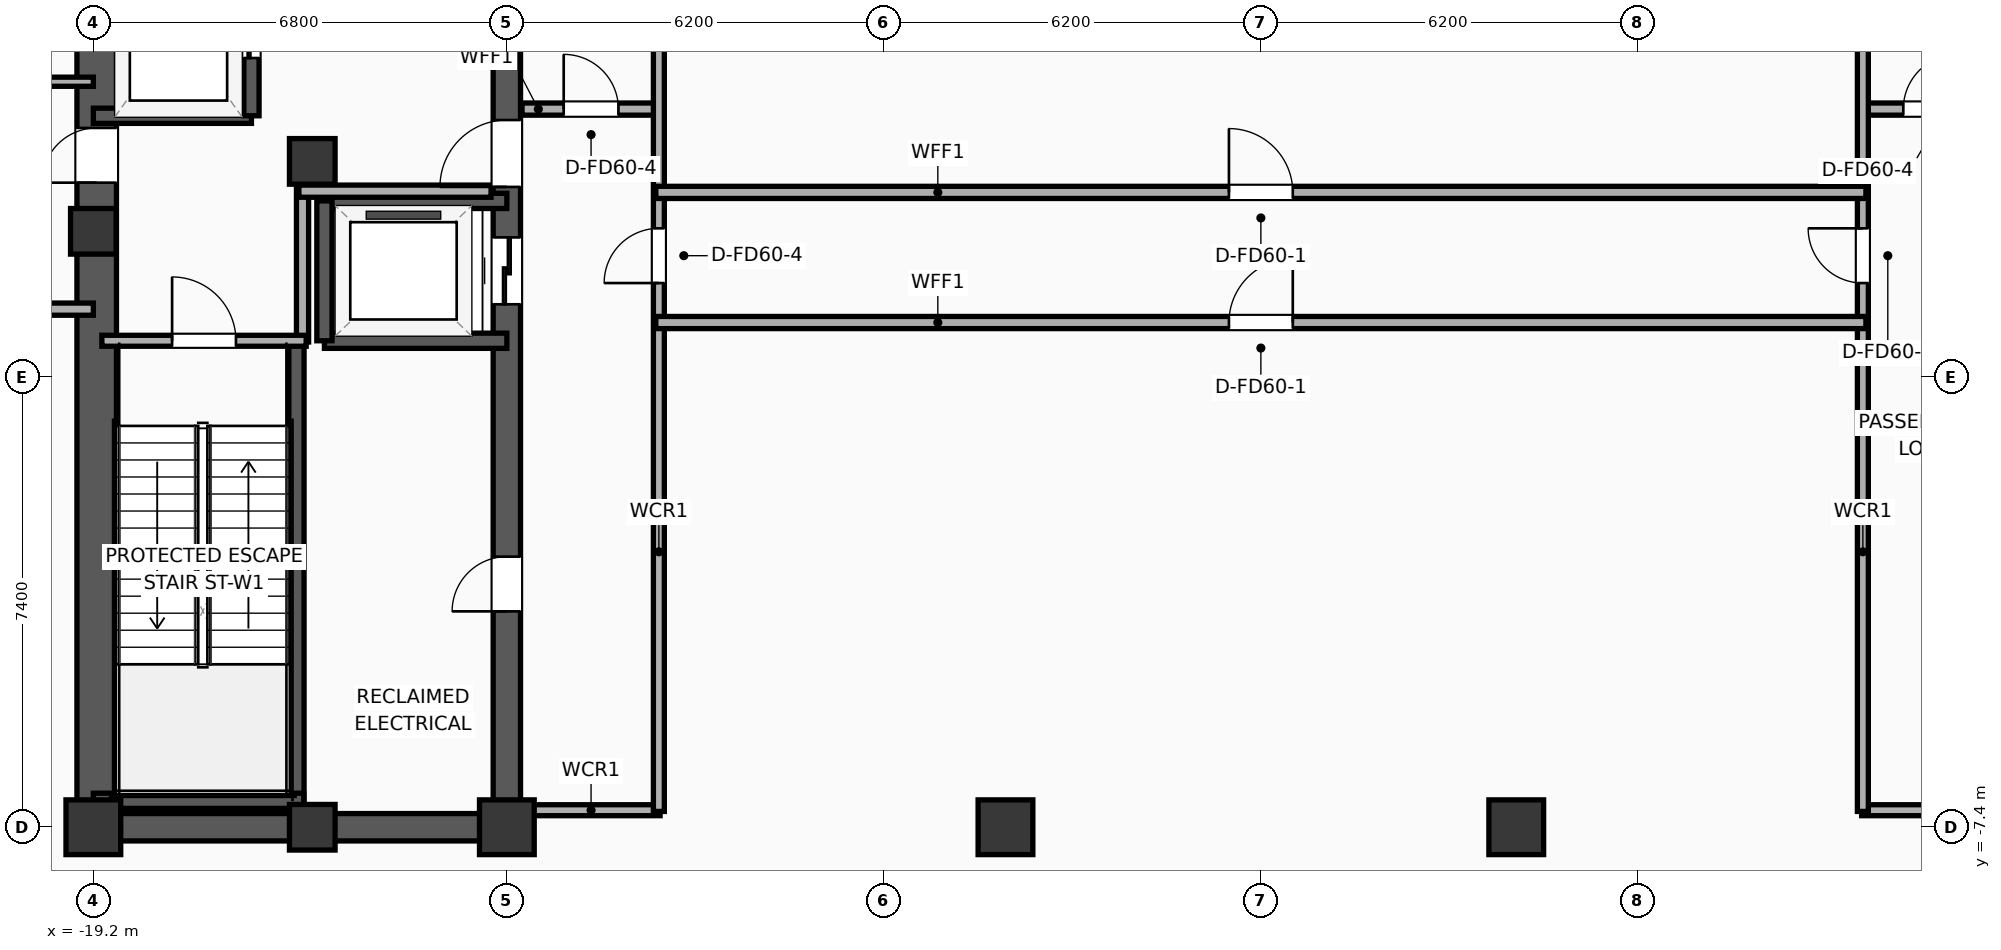
"""IFC4 building model, lengths in metres.
Left out: names, types, materials, properties, quantities, classifications, styles, units other than length and angle.
Written with IfcOpenShell. Run it as: python <this file> out.ifc"""

import sys

from ifc_helpers import new_model, si_unit, direction, frame, frame_2d, origin, origin_2d, place, context, subcontext, project, spatial, rectangle, extrude, element, fill, save


model = new_model("IFC4")
c1 = context("Model", 3, precision=1e-05, world=origin(), true_north=direction((0.0, 1.0)))
c2 = subcontext(c1, "Body", "Model", "MODEL_VIEW")
j1 = project(units=[si_unit("LENGTHUNIT", "METRE"), si_unit("PLANEANGLEUNIT", "RADIAN")], contexts=[c1])
p1 = place(None, origin())
s1 = spatial("IfcSite", under=j1, at=p1, CompositionType="ELEMENT")
p2 = place(p1, origin())
s2 = spatial("IfcBuilding", under=s1, at=p2, CompositionType="ELEMENT")
p3 = place(p2, frame((0.0, 0.0, 254.8)))
s3 = spatial("IfcBuildingStorey", under=s2, at=p3, CompositionType="ELEMENT", Elevation=254.8)
p4 = place(p3, frame((-19.2, -7.4, 0.0), z_axis=(0.0, 0.0, 1.0), x_axis=(1.0, 0.0, 0.0)))
e1 = element("IfcColumn", 1, at=p4, inside=s3, PredefinedType="COLUMN", context=c2, shape_type="SweptSolid", body=[
    extrude(rectangle(XDim=0.9, YDim=0.9, at=origin_2d()), origin(), (0.0, 0.0, 1.0), 5.2),
])
for number, where, z_axis, x_axis in (
    (2, (-19.2, 2.4, 0.0), (0.0, 0.0, 1.0), (1.0, 0.0, 0.0)),
    (3, (-15.6, -7.4, 0.0), (0.0, 0.0, 1.0), (1.0, 0.0, 0.0)),
):
    element("IfcColumn", number, at=place(p3, frame(where, z_axis=z_axis, x_axis=x_axis)), inside=s3, PredefinedType="COLUMN", context=c2, shape_type="SweptSolid", body=[
        extrude(rectangle(XDim=0.75, YDim=0.75, at=origin_2d()), origin(), (0.0, 0.0, 1.0), 5.2),
    ])
p5 = place(p3, frame((-12.4, -7.4, 0.0), z_axis=(0.0, 0.0, 1.0), x_axis=(1.0, 0.0, 0.0)))
e4 = element("IfcColumn", 4, at=p5, inside=s3, PredefinedType="COLUMN", context=c2, shape_type="SweptSolid", body=[
    extrude(rectangle(XDim=0.9, YDim=0.9, at=origin_2d()), origin(), (0.0, 0.0, 1.0), 5.2),
])
p6 = place(p3, frame((-15.6, 3.55, 0.0), z_axis=(0.0, 0.0, 1.0), x_axis=(1.0, 0.0, 0.0)))
e5 = element("IfcColumn", 5, at=p6, inside=s3, PredefinedType="COLUMN", context=c2, shape_type="SweptSolid", body=[
    extrude(rectangle(XDim=0.75, YDim=0.75, at=origin_2d()), origin(), (0.0, 0.0, 1.0), 5.2),
])
p7 = place(p3, frame((-19.425, -7.4, 0.0), z_axis=(0.0, 0.0, 1.0), x_axis=(1.0, 0.0, 0.0)))
e6 = element("IfcWall", 6, at=p7, inside=s3, PredefinedType="SHEAR", context=c2, shape_type="SweptSolid", body=[
    extrude(rectangle(XDim=7.25, YDim=0.45, at=frame_2d((3.625, 0.0))), origin(), (0.0, 0.0, 1.0), 4.8),
])
p8 = place(p3, frame((-19.145, -7.4, 0.0), z_axis=(0.0, 0.0, 1.0), x_axis=(0.0, 1.0, 0.0)))
e7 = element("IfcWall", 7, at=p8, inside=s3, PredefinedType="SHEAR", context=c2, shape_type="SweptSolid", body=[
    extrude(rectangle(XDim=14.8, YDim=0.65, at=frame_2d((7.4, 0.0))), origin(), (0.0, 0.0, 1.0), 4.8),
])
p9 = place(p8, frame((10.6, 0.0, 0.0)))
e8 = element("IfcOpeningElement", 8, at=p9, cuts=e7, PredefinedType="OPENING", context=c2, shape_type="SweptSolid", body=[
    extrude(rectangle(XDim=0.9, YDim=2.05, at=frame_2d((0.45, 1.025))), frame((0.0, 0.335, 0.0), z_axis=(0.0, -1.0, 0.0), x_axis=(1.0, 0.0, 0.0)), (0.0, 0.0, 1.0), 0.67),
])
p10 = place(p3, frame((-12.4, -7.4, 0.0), z_axis=(0.0, 0.0, 1.0), x_axis=(0.0, 1.0, 0.0)))
e9 = element("IfcWall", 9, at=p10, inside=s3, PredefinedType="SHEAR", context=c2, shape_type="SweptSolid", body=[
    extrude(rectangle(XDim=14.8, YDim=0.45, at=frame_2d((7.4, 0.0))), origin(), (0.0, 0.0, 1.0), 4.8),
])
p11 = place(p10, frame((8.6, 0.0, 0.0)))
e10 = element("IfcOpeningElement", 10, at=p11, cuts=e9, PredefinedType="OPENING", context=c2, shape_type="SweptSolid", body=[
    extrude(rectangle(XDim=1.1, YDim=2.05, at=frame_2d((0.55, 1.025))), frame((0.0, 0.235, 0.0), z_axis=(0.0, -1.0, 0.0), x_axis=(1.0, 0.0, 0.0)), (0.0, 0.0, 1.0), 0.47),
])
p12 = place(p10, frame((10.53, 0.0, 0.0)))
e11 = element("IfcOpeningElement", 11, at=p12, cuts=e9, PredefinedType="OPENING", context=c2, shape_type="SweptSolid", body=[
    extrude(rectangle(XDim=1.1, YDim=2.05, at=frame_2d((0.55, 1.025))), frame((0.0, 0.235, 0.0), z_axis=(0.0, -1.0, 0.0), x_axis=(1.0, 0.0, 0.0)), (0.0, 0.0, 1.0), 0.47),
])
p13 = place(p10, frame((3.55, 0.0, 0.0)))
e12 = element("IfcOpeningElement", 12, at=p13, cuts=e9, PredefinedType="OPENING", context=c2, shape_type="SweptSolid", body=[
    extrude(rectangle(XDim=0.9, YDim=2.05, at=frame_2d((0.45, 1.025))), frame((0.0, 0.235, 0.0), z_axis=(0.0, -1.0, 0.0), x_axis=(1.0, 0.0, 0.0)), (0.0, 0.0, 1.0), 0.47),
])
p14 = place(p3, frame((-15.86, -7.085, 0.0), z_axis=(0.0, 0.0, 1.0), x_axis=(0.0, 1.0, 0.0)))
e13 = element("IfcWall", 13, at=p14, inside=s3, PredefinedType="SOLIDWALL", context=c2, shape_type="SweptSolid", body=[
    extrude(rectangle(XDim=7.685, YDim=0.25, at=frame_2d((3.843, 0.0))), origin(), (0.0, 0.0, 1.0), 4.8),
])
p15 = place(p3, frame((-19.2, -6.965, 0.0), z_axis=(0.0, 0.0, 1.0), x_axis=(1.0, 0.0, 0.0)))
e14 = element("IfcWall", 14, at=p15, inside=s3, PredefinedType="SOLIDWALL", context=c2, shape_type="SweptSolid", body=[
    extrude(rectangle(XDim=3.46, YDim=0.25, at=frame_2d((1.73, 0.0))), origin(), (0.0, 0.0, 1.0), 4.8),
])
for number, where, z_axis, x_axis in (
    (15, (-4.2, -7.4, 0.0), (0.0, 0.0, 1.0), (1.0, 0.0, 0.0)),
    (16, (4.2, -7.4, 0.0), (0.0, 0.0, 1.0), (1.0, 0.0, 0.0)),
):
    element("IfcColumn", number, at=place(p3, frame(where, z_axis=z_axis, x_axis=x_axis)), inside=s3, PredefinedType="COLUMN", context=c2, shape_type="SweptSolid", body=[
        extrude(rectangle(XDim=0.9, YDim=0.9, at=origin_2d()), origin(), (0.0, 0.0, 1.0), 5.2),
    ])
p16 = place(p3, frame((-19.2, 4.3, 0.0), z_axis=(0.0, 0.0, 1.0), x_axis=(1.0, 0.0, 0.0)))
e17 = element("IfcWall", 17, at=p16, inside=s3, PredefinedType="SOLIDWALL", context=c2, shape_type="SweptSolid", body=[
    extrude(rectangle(XDim=2.6, YDim=0.25, at=frame_2d((1.3, 0.0))), origin(), (0.0, 0.0, 1.0), 4.8),
])
p17 = place(p3, frame((-16.6, 4.3, 0.0), z_axis=(0.0, 0.0, 1.0), x_axis=(0.0, 1.0, 0.0)))
e18 = element("IfcWall", 18, at=p17, inside=s3, PredefinedType="SOLIDWALL", context=c2, shape_type="SweptSolid", body=[
    extrude(rectangle(XDim=3.1, YDim=0.25, at=frame_2d((1.55, 0.0))), origin(), (0.0, 0.0, 1.0), 4.8),
])
p18 = place(p17, frame((0.95, 0.0, 0.0)))
e19 = element("IfcOpeningElement", 19, at=p18, cuts=e18, PredefinedType="OPENING", context=c2, shape_type="SweptSolid", body=[
    extrude(rectangle(XDim=1.2, YDim=2.05, at=frame_2d((0.6, 1.025))), frame((0.0, 0.135, 0.0), z_axis=(0.0, -1.0, 0.0), x_axis=(1.0, 0.0, 0.0)), (0.0, 0.0, 1.0), 0.27),
])
for number, where, z_axis, x_axis in (
    (20, (-15.4, 0.6, 0.0), (0.0, 0.0, 1.0), (1.0, 0.0, 0.0)),
    (21, (-12.4, 2.9, 0.0), (0.0, 0.0, 1.0), (-1.0, 0.0, 0.0)),
):
    element("IfcWall", number, at=place(p3, frame(where, z_axis=z_axis, x_axis=x_axis)), inside=s3, PredefinedType="SOLIDWALL", context=c2, shape_type="SweptSolid", body=[
        extrude(rectangle(XDim=3.0, YDim=0.25, at=frame_2d((1.5, 0.0))), origin(), (0.0, 0.0, 1.0), 4.8),
    ])
p19 = place(p3, frame((-15.4, 2.9, 0.0), z_axis=(0.0, 0.0, 1.0), x_axis=(0.0, -1.0, 0.0)))
e22 = element("IfcWall", 22, at=p19, inside=s3, PredefinedType="SOLIDWALL", context=c2, shape_type="SweptSolid", body=[
    extrude(rectangle(XDim=2.3, YDim=0.25, at=frame_2d((1.15, 0.0))), origin(), (0.0, 0.0, 1.0), 4.8),
])
p20 = place(p3, frame((-15.76, 0.58, 0.0), z_axis=(0.0, 0.0, 1.0), x_axis=(0.0, 1.0, 0.0)))
e23 = element("IfcWall", 23, at=p20, inside=s3, PredefinedType="PARTITIONING", context=c2, shape_type="SweptSolid", body=[
    extrude(rectangle(XDim=2.52, YDim=0.2, at=frame_2d((1.26, 0.0))), origin(), (0.0, 0.0, 1.0), 4.8),
])
p21 = place(p3, frame((-15.82, 3.06, 0.0), z_axis=(0.0, 0.0, 1.0), x_axis=(1.0, 0.0, 0.0)))
e24 = element("IfcWall", 24, at=p21, inside=s3, PredefinedType="PARTITIONING", context=c2, shape_type="SweptSolid", body=[
    extrude(rectangle(XDim=3.16, YDim=0.2, at=frame_2d((1.58, 0.0))), origin(), (0.0, 0.0, 1.0), 4.8),
])
p22 = place(p3, frame((-19.06, 0.6, 0.0), z_axis=(0.0, 0.0, 1.0), x_axis=(1.0, 0.0, 0.0)))
e25 = element("IfcWall", 25, at=p22, inside=s3, PredefinedType="PARTITIONING", context=c2, shape_type="SweptSolid", body=[
    extrude(rectangle(XDim=3.36, YDim=0.18, at=frame_2d((1.68, 0.0))), origin(), (0.0, 0.0, 1.0), 4.8),
])
p23 = place(p22, frame((1.155, 0.0, 0.0)))
e26 = element("IfcOpeningElement", 26, at=p23, cuts=e25, PredefinedType="OPENING", context=c2, shape_type="SweptSolid", body=[
    extrude(rectangle(XDim=1.05, YDim=2.05, at=frame_2d((0.525, 1.025))), frame((0.0, 0.1, 0.0), z_axis=(0.0, -1.0, 0.0), x_axis=(1.0, 0.0, 0.0)), (0.0, 0.0, 1.0), 0.2),
])
p24 = place(p3, frame((-12.15, 4.41, 0.0), z_axis=(0.0, 0.0, 1.0), x_axis=(1.0, 0.0, 0.0)))
e27 = element("IfcWall", 27, at=p24, inside=s3, PredefinedType="PARTITIONING", context=c2, shape_type="SweptSolid", body=[
    extrude(rectangle(XDim=2.27, YDim=0.2, at=frame_2d((1.135, 0.0))), origin(), (0.0, 0.0, 1.0), 4.8),
])
p25 = place(p24, frame((0.685, 0.0, 0.0)))
e28 = element("IfcOpeningElement", 28, at=p25, cuts=e27, PredefinedType="OPENING", context=c2, shape_type="SweptSolid", body=[
    extrude(rectangle(XDim=0.9, YDim=2.05, at=frame_2d((0.45, 1.025))), frame((0.0, 0.11, 0.0), z_axis=(0.0, -1.0, 0.0), x_axis=(1.0, 0.0, 0.0)), (0.0, 0.0, 1.0), 0.22),
])
p26 = place(p3, frame((-12.15, -7.12, 0.0), z_axis=(0.0, 0.0, 1.0), x_axis=(1.0, 0.0, 0.0)))
e29 = element("IfcWall", 29, at=p26, inside=s3, PredefinedType="PARTITIONING", context=c2, shape_type="SweptSolid", body=[
    extrude(rectangle(XDim=2.27, YDim=0.18, at=frame_2d((1.135, 0.0))), origin(), (0.0, 0.0, 1.0), 3.84),
])
p27 = place(p3, frame((9.88, 4.41, 0.0), z_axis=(0.0, 0.0, 1.0), x_axis=(1.0, 0.0, 0.0)))
e30 = element("IfcWall", 30, at=p27, inside=s3, PredefinedType="PARTITIONING", context=c2, shape_type="SweptSolid", body=[
    extrude(rectangle(XDim=2.27, YDim=0.2, at=frame_2d((1.135, 0.0))), origin(), (0.0, 0.0, 1.0), 4.8),
])
p28 = place(p27, frame((0.685, 0.0, 0.0)))
e31 = element("IfcOpeningElement", 31, at=p28, cuts=e30, PredefinedType="OPENING", context=c2, shape_type="SweptSolid", body=[
    extrude(rectangle(XDim=0.9, YDim=2.05, at=frame_2d((0.45, 1.025))), frame((0.0, 0.11, 0.0), z_axis=(0.0, -1.0, 0.0), x_axis=(1.0, 0.0, 0.0)), (0.0, 0.0, 1.0), 0.22),
])
p29 = place(p3, frame((9.88, -7.12, 0.0), z_axis=(0.0, 0.0, 1.0), x_axis=(1.0, 0.0, 0.0)))
e32 = element("IfcWall", 32, at=p29, inside=s3, PredefinedType="PARTITIONING", context=c2, shape_type="SweptSolid", body=[
    extrude(rectangle(XDim=2.27, YDim=0.18, at=frame_2d((1.135, 0.0))), origin(), (0.0, 0.0, 1.0), 3.84),
])
p30 = place(p3, frame((-9.9, -7.14, 0.0), z_axis=(0.0, 0.0, 1.0), x_axis=(0.0, 1.0, 0.0)))
e33 = element("IfcWall", 33, at=p30, inside=s3, PredefinedType="PARTITIONING", context=c2, shape_type="SweptSolid", body=[
    extrude(rectangle(XDim=14.28, YDim=0.18, at=frame_2d((7.14, 0.0))), origin(), (0.0, 0.0, 1.0), 4.8),
])
p31 = place(p30, frame((8.689, 0.0, 0.0)))
e34 = element("IfcOpeningElement", 34, at=p31, cuts=e33, PredefinedType="OPENING", context=c2, shape_type="SweptSolid", body=[
    extrude(rectangle(XDim=0.9, YDim=2.05, at=frame_2d((0.45, 1.025))), frame((0.0, 0.1, 0.0), z_axis=(0.0, -1.0, 0.0), x_axis=(1.0, 0.0, 0.0)), (0.0, 0.0, 1.0), 0.2),
])
p32 = place(p3, frame((9.9, -7.14, 0.0), z_axis=(0.0, 0.0, 1.0), x_axis=(0.0, 1.0, 0.0)))
e35 = element("IfcWall", 35, at=p32, inside=s3, PredefinedType="PARTITIONING", context=c2, shape_type="SweptSolid", body=[
    extrude(rectangle(XDim=14.28, YDim=0.18, at=frame_2d((7.14, 0.0))), origin(), (0.0, 0.0, 1.0), 4.8),
])
p33 = place(p32, frame((8.689, 0.0, 0.0)))
e36 = element("IfcOpeningElement", 36, at=p33, cuts=e35, PredefinedType="OPENING", context=c2, shape_type="SweptSolid", body=[
    extrude(rectangle(XDim=0.9, YDim=2.05, at=frame_2d((0.45, 1.025))), frame((0.0, 0.1, 0.0), z_axis=(0.0, -1.0, 0.0), x_axis=(1.0, 0.0, 0.0)), (0.0, 0.0, 1.0), 0.2),
])
p34 = place(p3, frame((-9.95, 3.04, 0.0), z_axis=(0.0, 0.0, 1.0), x_axis=(1.0, 0.0, 0.0)))
e37 = element("IfcWall", 37, at=p34, inside=s3, PredefinedType="PARTITIONING", context=c2, shape_type="SweptSolid", body=[
    extrude(rectangle(XDim=19.9, YDim=0.2, at=frame_2d((9.95, 0.0))), origin(), (0.0, 0.0, 1.0), 4.8),
])
p35 = place(p34, frame((9.425, 0.0, 0.0)))
e38 = element("IfcOpeningElement", 38, at=p35, cuts=e37, PredefinedType="OPENING", context=c2, shape_type="SweptSolid", body=[
    extrude(rectangle(XDim=1.05, YDim=2.05, at=frame_2d((0.525, 1.025))), frame((0.0, 0.11, 0.0), z_axis=(0.0, -1.0, 0.0), x_axis=(1.0, 0.0, 0.0)), (0.0, 0.0, 1.0), 0.22),
])
p36 = place(p3, frame((-9.95, 0.9, 0.0), z_axis=(0.0, 0.0, 1.0), x_axis=(1.0, 0.0, 0.0)))
e39 = element("IfcWall", 39, at=p36, inside=s3, PredefinedType="PARTITIONING", context=c2, shape_type="SweptSolid", body=[
    extrude(rectangle(XDim=19.9, YDim=0.2, at=frame_2d((9.95, 0.0))), origin(), (0.0, 0.0, 1.0), 4.8),
])
p37 = place(p36, frame((9.425, 0.0, 0.0)))
e40 = element("IfcOpeningElement", 40, at=p37, cuts=e39, PredefinedType="OPENING", context=c2, shape_type="SweptSolid", body=[
    extrude(rectangle(XDim=1.05, YDim=2.05, at=frame_2d((0.525, 1.025))), frame((0.0, 0.11, 0.0), z_axis=(0.0, -1.0, 0.0), x_axis=(1.0, 0.0, 0.0)), (0.0, 0.0, 1.0), 0.22),
])
p38 = place(p3, frame((-29.46, 1.12, 0.0), z_axis=(0.0, 0.0, 1.0), x_axis=(1.0, 0.0, 0.0)))
e41 = element("IfcWall", 41, at=p38, inside=s3, PredefinedType="PARTITIONING", context=c2, shape_type="SweptSolid", body=[
    extrude(rectangle(XDim=10.26, YDim=0.2, at=frame_2d((5.13, 0.0))), origin(), (0.0, 0.0, 1.0), 4.8),
])
p39 = place(p3, frame((-23.52, 4.86, 0.0), z_axis=(0.0, 0.0, 1.0), x_axis=(1.0, 0.0, 0.0)))
e42 = element("IfcWall", 42, at=p39, inside=s3, PredefinedType="PLUMBINGWALL", context=c2, shape_type="SweptSolid", body=[
    extrude(rectangle(XDim=4.32, YDim=0.15, at=frame_2d((2.16, 0.0))), origin(), (0.0, 0.0, 1.0), 4.8),
])
p40 = place(p18, origin())
e43 = element("IfcDoor", 43, at=p40, inside=s3, OperationType="SLIDING_TO_LEFT", PredefinedType="DOOR", context=c2, shape_type="SweptSolid", body=[
    extrude(rectangle(XDim=1.2, YDim=2.05, at=frame_2d((0.6, 1.025))), frame((0.0, 0.025, 0.0), z_axis=(0.0, -1.0, 0.0), x_axis=(1.0, 0.0, 0.0)), (0.0, 0.0, 1.0), 0.05),
])
fill(e19, e43)
p41 = place(p11, origin())
e44 = element("IfcDoor", 44, at=p41, inside=s3, OperationType="SLIDING_TO_LEFT", PredefinedType="DOOR", context=c2, shape_type="SweptSolid", body=[
    extrude(rectangle(XDim=1.1, YDim=2.05, at=frame_2d((0.55, 1.025))), frame((0.0, 0.025, 0.0), z_axis=(0.0, -1.0, 0.0), x_axis=(1.0, 0.0, 0.0)), (0.0, 0.0, 1.0), 0.05),
])
fill(e10, e44)
p42 = place(p23, origin())
e45 = element("IfcDoor", 45, at=p42, inside=s3, OperationType="SINGLE_SWING_LEFT", PredefinedType="DOOR", context=c2, shape_type="SweptSolid", body=[
    extrude(rectangle(XDim=1.05, YDim=2.05, at=frame_2d((0.525, 1.025))), frame((0.0, 0.025, 0.0), z_axis=(0.0, -1.0, 0.0), x_axis=(1.0, 0.0, 0.0)), (0.0, 0.0, 1.0), 0.05),
])
fill(e26, e45)
p43 = place(p25, origin())
e46 = element("IfcDoor", 46, at=p43, inside=s3, OperationType="SINGLE_SWING_LEFT", PredefinedType="DOOR", context=c2, shape_type="SweptSolid", body=[
    extrude(rectangle(XDim=0.9, YDim=2.05, at=frame_2d((0.45, 1.025))), frame((0.0, 0.025, 0.0), z_axis=(0.0, -1.0, 0.0), x_axis=(1.0, 0.0, 0.0)), (0.0, 0.0, 1.0), 0.05),
])
fill(e28, e46)
p44 = place(p28, origin())
e47 = element("IfcDoor", 47, at=p44, inside=s3, OperationType="SINGLE_SWING_RIGHT", PredefinedType="DOOR", context=c2, shape_type="SweptSolid", body=[
    extrude(rectangle(XDim=0.9, YDim=2.05, at=frame_2d((0.45, 1.025))), frame((0.0, 0.025, 0.0), z_axis=(0.0, -1.0, 0.0), x_axis=(1.0, 0.0, 0.0)), (0.0, 0.0, 1.0), 0.05),
])
fill(e31, e47)
p45 = place(p31, origin())
e48 = element("IfcDoor", 48, at=p45, inside=s3, OperationType="SINGLE_SWING_LEFT", PredefinedType="DOOR", context=c2, shape_type="SweptSolid", body=[
    extrude(rectangle(XDim=0.9, YDim=2.05, at=frame_2d((0.45, 1.025))), frame((0.0, 0.025, 0.0), z_axis=(0.0, -1.0, 0.0), x_axis=(1.0, 0.0, 0.0)), (0.0, 0.0, 1.0), 0.05),
])
fill(e34, e48)
p46 = place(p33, origin())
e49 = element("IfcDoor", 49, at=p46, inside=s3, OperationType="SINGLE_SWING_RIGHT", PredefinedType="DOOR", context=c2, shape_type="SweptSolid", body=[
    extrude(rectangle(XDim=0.9, YDim=2.05, at=frame_2d((0.45, 1.025))), frame((0.0, 0.025, 0.0), z_axis=(0.0, -1.0, 0.0), x_axis=(1.0, 0.0, 0.0)), (0.0, 0.0, 1.0), 0.05),
])
fill(e36, e49)
p47 = place(p35, origin())
e50 = element("IfcDoor", 50, at=p47, inside=s3, OperationType="SINGLE_SWING_LEFT", PredefinedType="DOOR", context=c2, shape_type="SweptSolid", body=[
    extrude(rectangle(XDim=1.05, YDim=2.05, at=frame_2d((0.525, 1.025))), frame((0.0, 0.025, 0.0), z_axis=(0.0, -1.0, 0.0), x_axis=(1.0, 0.0, 0.0)), (0.0, 0.0, 1.0), 0.05),
])
fill(e38, e50)
p48 = place(p37, origin())
e51 = element("IfcDoor", 51, at=p48, inside=s3, OperationType="SINGLE_SWING_RIGHT", PredefinedType="DOOR", context=c2, shape_type="SweptSolid", body=[
    extrude(rectangle(XDim=1.05, YDim=2.05, at=frame_2d((0.525, 1.025))), frame((0.0, 0.025, 0.0), z_axis=(0.0, -1.0, 0.0), x_axis=(1.0, 0.0, 0.0)), (0.0, 0.0, 1.0), 0.05),
])
fill(e40, e51)
p49 = place(p12, origin())
e52 = element("IfcDoor", 52, at=p49, inside=s3, OperationType="SINGLE_SWING_LEFT", PredefinedType="DOOR", context=c2, shape_type="SweptSolid", body=[
    extrude(rectangle(XDim=1.1, YDim=2.05, at=frame_2d((0.55, 1.025))), frame((0.0, 0.025, 0.0), z_axis=(0.0, -1.0, 0.0), x_axis=(1.0, 0.0, 0.0)), (0.0, 0.0, 1.0), 0.05),
])
fill(e11, e52)
p50 = place(p9, origin())
e53 = element("IfcDoor", 53, at=p50, inside=s3, OperationType="SINGLE_SWING_LEFT", PredefinedType="DOOR", context=c2, shape_type="SweptSolid", body=[
    extrude(rectangle(XDim=0.9, YDim=2.05, at=frame_2d((0.45, 1.025))), frame((0.0, 0.025, 0.0), z_axis=(0.0, -1.0, 0.0), x_axis=(1.0, 0.0, 0.0)), (0.0, 0.0, 1.0), 0.05),
])
fill(e8, e53)
p51 = place(p13, origin())
e54 = element("IfcDoor", 54, at=p51, inside=s3, OperationType="SINGLE_SWING_LEFT", PredefinedType="DOOR", context=c2, shape_type="SweptSolid", body=[
    extrude(rectangle(XDim=0.9, YDim=2.05, at=frame_2d((0.45, 1.025))), frame((0.0, 0.025, 0.0), z_axis=(0.0, -1.0, 0.0), x_axis=(1.0, 0.0, 0.0)), (0.0, 0.0, 1.0), 0.05),
])
fill(e12, e54)
save(model, sys.argv[1])
